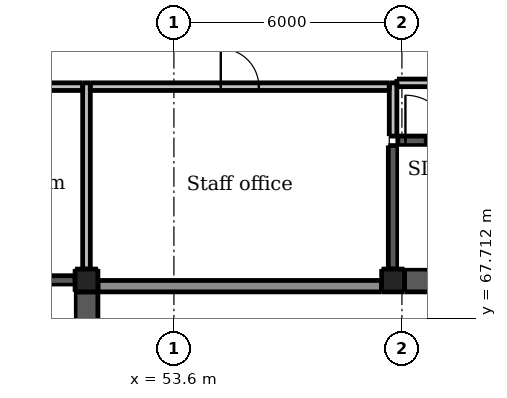
"""IFC4 building model, lengths in metres.
Left out: names, types, materials, properties, quantities, classifications, styles, units other than length and angle.
Written with IfcOpenShell. Run it as: python <this file> out.ifc"""

import sys

from ifc_helpers import new_model, si_unit, direction, frame, frame_2d, origin, origin_2d, place, context, subcontext, project, spatial, rectangle, extrude, element, fill, save


model = new_model("IFC4")
c1 = context("Model", 3, precision=1e-05, world=origin(), true_north=direction((0.0, 1.0)))
c2 = subcontext(c1, "Body", "Model", "MODEL_VIEW")
j1 = project(units=[si_unit("LENGTHUNIT", "METRE"), si_unit("PLANEANGLEUNIT", "RADIAN")], contexts=[c1])
p1 = place(None, origin())
s1 = spatial("IfcSite", under=j1, at=p1, CompositionType="ELEMENT")
p2 = place(p1, origin())
s2 = spatial("IfcBuilding", under=s1, at=p2, CompositionType="ELEMENT")
p3 = place(p2, frame((0.0, 0.0, 5.5)))
s3 = spatial("IfcBuildingStorey", under=s2, at=p3, CompositionType="ELEMENT", Elevation=5.5)
p4 = place(p3, frame((59.6, 67.4, 0.0), z_axis=(0.0, 0.0, 1.0), x_axis=(1.0, 0.0, 0.0)))
e1 = element("IfcColumn", 1, at=p4, inside=s3, PredefinedType="COLUMN", context=c2, shape_type="SweptSolid", body=[
    extrude(rectangle(XDim=1.2, YDim=1.2, at=origin_2d()), origin(), (0.0, 0.0, 1.0), 4.2),
])
for number, where, z_axis, x_axis in (
    (2, (51.3, 68.7, -0.3), (0.0, 0.0, 1.0), (1.0, 0.0, 0.0)),
    (3, (59.367, 68.7, -0.3), (0.0, 0.0, 1.0), (1.0, 0.0, 0.0)),
):
    element("IfcColumn", number, at=place(p3, frame(where, z_axis=z_axis, x_axis=x_axis)), inside=s3, PredefinedType="COLUMN", context=c2, shape_type="SweptSolid", body=[
        extrude(rectangle(XDim=0.6, YDim=0.6, at=origin_2d()), origin(), (0.0, 0.0, 1.0), 4.5),
    ])
p5 = place(p3, frame((47.5, 68.7, -0.3), z_axis=(0.0, 0.0, 1.0), x_axis=(1.0, 0.0, 0.0)))
e4 = element("IfcWall", 4, at=p5, inside=s3, PredefinedType="SHEAR", context=c2, shape_type="SweptSolid", body=[
    extrude(rectangle(XDim=3.5, YDim=0.25, at=frame_2d((1.75, 0.0))), origin(), (0.0, 0.0, 1.0), 4.5),
])
p6 = place(p3, frame((51.3, 61.45, -0.3), z_axis=(0.0, 0.0, 1.0), x_axis=(0.0, 1.0, 0.0)))
e5 = element("IfcWall", 5, at=p6, inside=s3, PredefinedType="SHEAR", context=c2, shape_type="SweptSolid", body=[
    extrude(rectangle(XDim=6.95, YDim=0.6, at=frame_2d((3.475, 0.0))), origin(), (0.0, 0.0, 1.0), 4.5),
])
p7 = place(p3, frame((59.492, 72.375, -0.3), z_axis=(0.0, 0.0, 1.0), x_axis=(1.0, 0.0, 0.0)))
e6 = element("IfcWall", 6, at=p7, inside=s3, PredefinedType="SHEAR", context=c2, shape_type="SweptSolid", body=[
    extrude(rectangle(XDim=7.816, YDim=0.25, at=frame_2d((3.908, 0.0))), origin(), (0.0, 0.0, 1.0), 4.5),
])
p8 = place(p7, frame((0.2, 0.0, 0.3)))
e7 = element("IfcOpeningElement", 7, at=p8, cuts=e6, PredefinedType="OPENING", context=c2, shape_type="SweptSolid", body=[
    extrude(rectangle(XDim=1.2, YDim=2.1, at=frame_2d((0.6, 1.05))), frame((0.0, 0.135, 0.0), z_axis=(0.0, -1.0, 0.0), x_axis=(1.0, 0.0, 0.0)), (0.0, 0.0, 1.0), 0.27),
])
p9 = place(p3, frame((59.367, 69.0, -0.3), z_axis=(0.0, 0.0, 1.0), x_axis=(0.0, 1.0, 0.0)))
e8 = element("IfcWall", 8, at=p9, inside=s3, PredefinedType="SHEAR", context=c2, shape_type="SweptSolid", body=[
    extrude(rectangle(XDim=3.25, YDim=0.25, at=frame_2d((1.625, 0.0))), origin(), (0.0, 0.0, 1.0), 4.5),
])
p10 = place(p3, frame((59.667, 68.7, -0.3), z_axis=(0.0, 0.0, 1.0), x_axis=(1.0, 0.0, 0.0)))
e9 = element("IfcWall", 9, at=p10, inside=s3, PredefinedType="SHEAR", context=c2, shape_type="SweptSolid", body=[
    extrude(rectangle(XDim=7.466, YDim=0.6, at=frame_2d((3.733, 0.0))), origin(), (0.0, 0.0, 1.0), 4.5),
])
p11 = place(p3, frame((52.0, 67.875, 0.0), z_axis=(0.0, 0.0, 1.0), x_axis=(1.0, 0.0, 0.0)))
e10 = element("IfcWall", 10, at=p11, inside=s3, PredefinedType="SOLIDWALL", context=c2, shape_type="SweptSolid", body=[
    extrude(rectangle(XDim=7.0, YDim=0.25, at=frame_2d((3.5, 0.0))), origin(), (0.0, 0.0, 1.0), 4.2),
])
p12 = place(p3, frame((60.2, 67.875, 0.0), z_axis=(0.0, 0.0, 1.0), x_axis=(1.0, 0.0, 0.0)))
e11 = element("IfcWall", 11, at=p12, inside=s3, PredefinedType="SOLIDWALL", context=c2, shape_type="SweptSolid", body=[
    extrude(rectangle(XDim=4.8, YDim=0.25, at=frame_2d((2.4, 0.0))), origin(), (0.0, 0.0, 1.0), 4.2),
])
p13 = place(p3, frame((52.125, 61.0, 0.0), z_axis=(0.0, 0.0, 1.0), x_axis=(0.0, 1.0, 0.0)))
e12 = element("IfcWall", 12, at=p13, inside=s3, PredefinedType="SOLIDWALL", context=c2, shape_type="SweptSolid", body=[
    extrude(rectangle(XDim=7.0, YDim=0.25, at=frame_2d((3.5, 0.0))), origin(), (0.0, 0.0, 1.0), 4.2),
])
p14 = place(p3, frame((51.6, 68.55, 0.0), z_axis=(0.0, 0.0, 1.0), x_axis=(1.0, 0.0, 0.0)))
e13 = element("IfcWall", 13, at=p14, inside=s3, PredefinedType="SOLIDWALL", context=c2, shape_type="SweptSolid", body=[
    extrude(rectangle(XDim=7.467, YDim=0.3, at=frame_2d((3.733, 0.0))), origin(), (0.0, 0.0, 1.0), 3.3),
])
p15 = place(p3, frame((51.4, 73.8, 0.0), z_axis=(0.0, 0.0, 1.0), x_axis=(1.0, 0.0, 0.0)))
e14 = element("IfcWall", 14, at=p15, inside=s3, PredefinedType="PARTITIONING", context=c2, shape_type="SweptSolid", body=[
    extrude(rectangle(XDim=7.867, YDim=0.2, at=frame_2d((3.934, 0.0))), origin(), (0.0, 0.0, 1.0), 3.1),
])
p16 = place(p15, frame((3.434, 0.0, 0.0)))
e15 = element("IfcOpeningElement", 15, at=p16, cuts=e14, PredefinedType="OPENING", context=c2, shape_type="SweptSolid", body=[
    extrude(rectangle(XDim=1.0, YDim=2.1, at=frame_2d((0.5, 1.05))), frame((0.0, 0.11, 0.0), z_axis=(0.0, -1.0, 0.0), x_axis=(1.0, 0.0, 0.0)), (0.0, 0.0, 1.0), 0.22),
])
p17 = place(p3, frame((59.367, 72.5, 0.0), z_axis=(0.0, 0.0, 1.0), x_axis=(0.0, 1.0, 0.0)))
e16 = element("IfcWall", 16, at=p17, inside=s3, PredefinedType="PARTITIONING", context=c2, shape_type="SweptSolid", body=[
    extrude(rectangle(XDim=1.4, YDim=0.2, at=frame_2d((0.7, 0.0))), origin(), (0.0, 0.0, 1.0), 3.1),
])
p18 = place(p3, frame((46.1, 73.8, 0.0), z_axis=(0.0, 0.0, 1.0), x_axis=(1.0, 0.0, 0.0)))
e17 = element("IfcWall", 17, at=p18, inside=s3, PredefinedType="PARTITIONING", context=c2, shape_type="SweptSolid", body=[
    extrude(rectangle(XDim=5.1, YDim=0.2, at=frame_2d((2.55, 0.0))), origin(), (0.0, 0.0, 1.0), 3.1),
])
p19 = place(p3, frame((51.3, 69.0, 0.0), z_axis=(0.0, 0.0, 1.0), x_axis=(0.0, 1.0, 0.0)))
e18 = element("IfcWall", 18, at=p19, inside=s3, PredefinedType="PARTITIONING", context=c2, shape_type="SweptSolid", body=[
    extrude(rectangle(XDim=4.9, YDim=0.2, at=frame_2d((2.45, 0.0))), origin(), (0.0, 0.0, 1.0), 3.1),
])
p20 = place(p3, frame((59.467, 73.9, 0.0), z_axis=(0.0, 0.0, 1.0), x_axis=(1.0, 0.0, 0.0)))
e19 = element("IfcWall", 19, at=p20, inside=s3, PredefinedType="PARTITIONING", context=c2, shape_type="SweptSolid", body=[
    extrude(rectangle(XDim=7.866, YDim=0.2, at=frame_2d((3.933, 0.0))), origin(), (0.0, 0.0, 1.0), 3.1),
])
p21 = place(p20, frame((3.433, 0.0, 0.0)))
e20 = element("IfcOpeningElement", 20, at=p21, cuts=e19, PredefinedType="OPENING", context=c2, shape_type="SweptSolid", body=[
    extrude(rectangle(XDim=1.0, YDim=2.1, at=frame_2d((0.5, 1.05))), frame((0.0, 0.11, 0.0), z_axis=(0.0, -1.0, 0.0), x_axis=(1.0, 0.0, 0.0)), (0.0, 0.0, 1.0), 0.22),
])
p22 = place(p16, origin())
e21 = element("IfcDoor", 21, at=p22, inside=s3, OperationType="SINGLE_SWING_LEFT", PredefinedType="DOOR", context=c2, shape_type="SweptSolid", body=[
    extrude(rectangle(XDim=1.0, YDim=2.1, at=frame_2d((0.5, 1.05))), frame((0.0, 0.025, 0.0), z_axis=(0.0, -1.0, 0.0), x_axis=(1.0, 0.0, 0.0)), (0.0, 0.0, 1.0), 0.05),
])
fill(e15, e21)
p23 = place(p8, origin())
e22 = element("IfcDoor", 22, at=p23, inside=s3, OperationType="SINGLE_SWING_LEFT", PredefinedType="DOOR", context=c2, shape_type="SweptSolid", body=[
    extrude(rectangle(XDim=1.2, YDim=2.1, at=frame_2d((0.6, 1.05))), frame((0.0, 0.025, 0.0), z_axis=(0.0, -1.0, 0.0), x_axis=(1.0, 0.0, 0.0)), (0.0, 0.0, 1.0), 0.05),
])
fill(e7, e22)
save(model, sys.argv[1])
